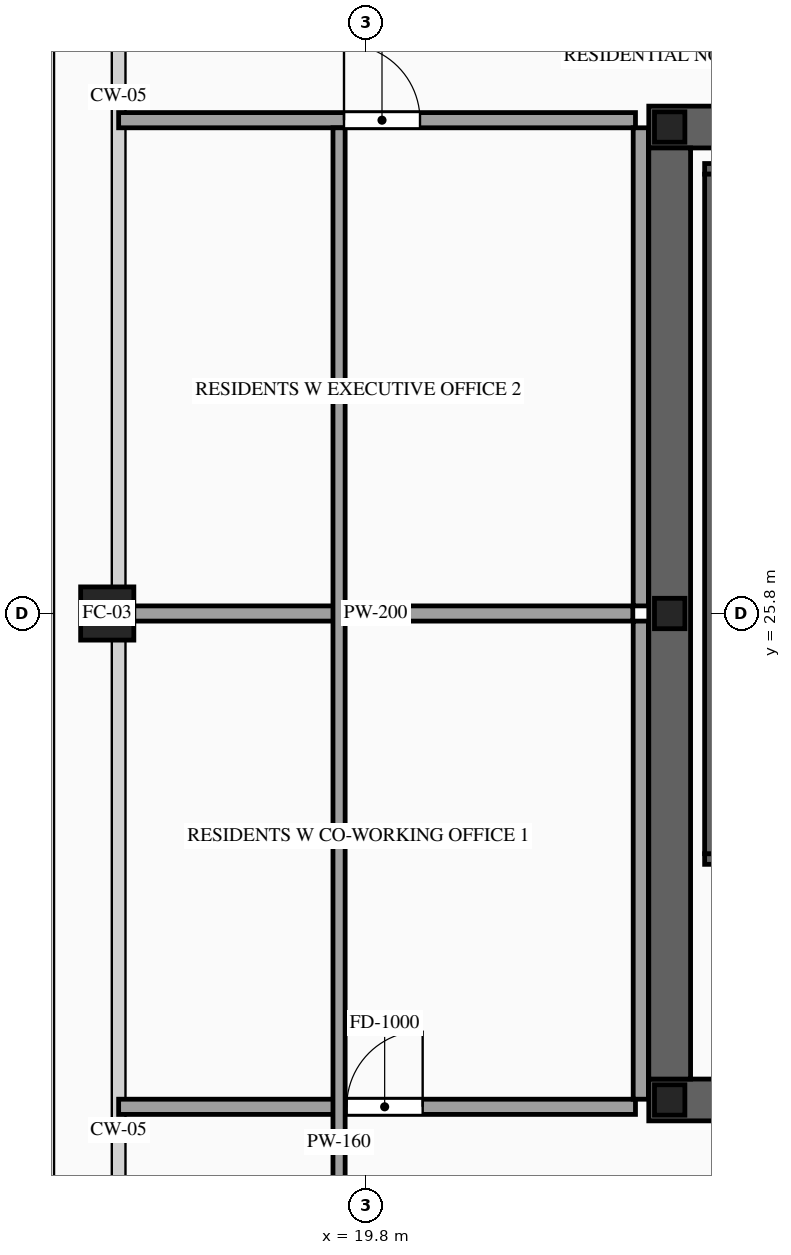
"""IFC4 building model, lengths in metres.
Left out: names, types, materials, properties, quantities, classifications, styles, units other than length and angle.
Written with IfcOpenShell. Run it as: python <this file> out.ifc"""

import sys

from ifc_helpers import new_model, si_unit, direction, frame, frame_2d, origin, origin_2d, place, context, subcontext, project, spatial, rectangle, hollow_rectangle, i_section, extrude, source, transform, mapped, element, fill, save


model = new_model("IFC4")
c1 = context("Model", 3, precision=1e-05, world=origin(), true_north=direction((0.0, 1.0)))
c2 = subcontext(c1, "Body", "Model", "MODEL_VIEW")
j1 = project(units=[si_unit("LENGTHUNIT", "METRE"), si_unit("PLANEANGLEUNIT", "RADIAN")], contexts=[c1])
p1 = place(None, origin())
s1 = spatial("IfcSite", under=j1, at=p1, CompositionType="ELEMENT")
p2 = place(p1, origin())
s2 = spatial("IfcBuilding", under=s1, at=p2, CompositionType="ELEMENT")
p3 = place(p2, frame((0.0, 0.0, 248.6)))
s3 = spatial("IfcBuildingStorey", under=s2, at=p3, CompositionType="ELEMENT", Elevation=248.6)
p4 = place(p3, frame((23.525, 19.4, 0.0), z_axis=(0.0, 0.0, 1.0), x_axis=(1.0, 0.0, 0.0)))
e1 = element("IfcWall", 1, at=p4, inside=s3, PredefinedType="SHEAR", context=c2, shape_type="SweptSolid", body=[
    extrude(rectangle(XDim=26.95, YDim=0.55, at=frame_2d((13.475, 0.0))), origin(), (0.0, 0.0, 1.0), 3.5),
])
p5 = place(p4, frame((1.925, 0.0, 0.0)))
e2 = element("IfcOpeningElement", 2, at=p5, cuts=e1, PredefinedType="OPENING", context=c2, shape_type="SweptSolid", body=[
    extrude(rectangle(XDim=1.1, YDim=2.2, at=frame_2d((0.55, 1.1))), frame((0.0, 0.29, 0.0), z_axis=(0.0, -1.0, 0.0), x_axis=(1.0, 0.0, 0.0)), (0.0, 0.0, 1.0), 0.58),
])
p6 = place(p4, frame((9.825, 0.0, 0.0)))
e3 = element("IfcOpeningElement", 3, at=p6, cuts=e1, PredefinedType="OPENING", context=c2, shape_type="SweptSolid", body=[
    extrude(rectangle(XDim=1.1, YDim=2.2, at=frame_2d((0.55, 1.1))), frame((0.0, 0.29, 0.0), z_axis=(0.0, -1.0, 0.0), x_axis=(1.0, 0.0, 0.0)), (0.0, 0.0, 1.0), 0.58),
])
p7 = place(p4, frame((23.025, 0.0, 0.0)))
e4 = element("IfcOpeningElement", 4, at=p7, cuts=e1, PredefinedType="OPENING", context=c2, shape_type="SweptSolid", body=[
    extrude(rectangle(XDim=1.1, YDim=2.2, at=frame_2d((0.55, 1.1))), frame((0.0, 0.29, 0.0), z_axis=(0.0, -1.0, 0.0), x_axis=(1.0, 0.0, 0.0)), (0.0, 0.0, 1.0), 0.58),
])
p8 = place(p4, frame((19.645, 0.0, 0.0)))
e5 = element("IfcOpeningElement", 5, at=p8, cuts=e1, PredefinedType="OPENING", context=c2, shape_type="SweptSolid", body=[
    extrude(rectangle(XDim=0.9, YDim=2.15, at=frame_2d((0.45, 1.075))), frame((0.0, 0.29, 0.0), z_axis=(0.0, -1.0, 0.0), x_axis=(1.0, 0.0, 0.0)), (0.0, 0.0, 1.0), 0.58),
])
p9 = place(p4, frame((18.205, 0.0, 0.0)))
e6 = element("IfcOpeningElement", 6, at=p9, cuts=e1, PredefinedType="OPENING", context=c2, shape_type="SweptSolid", body=[
    extrude(rectangle(XDim=0.9, YDim=2.15, at=frame_2d((0.45, 1.075))), frame((0.0, 0.29, 0.0), z_axis=(0.0, -1.0, 0.0), x_axis=(1.0, 0.0, 0.0)), (0.0, 0.0, 1.0), 0.58),
])
p10 = place(p3, frame((23.525, 32.2, 0.0), z_axis=(0.0, 0.0, 1.0), x_axis=(1.0, 0.0, 0.0)))
e7 = element("IfcWall", 7, at=p10, inside=s3, PredefinedType="SHEAR", context=c2, shape_type="SweptSolid", body=[
    extrude(rectangle(XDim=26.95, YDim=0.55, at=frame_2d((13.475, 0.0))), origin(), (0.0, 0.0, 1.0), 3.5),
])
p11 = place(p10, frame((4.545, 0.0, 0.0)))
e8 = element("IfcOpeningElement", 8, at=p11, cuts=e7, PredefinedType="OPENING", context=c2, shape_type="SweptSolid", body=[
    extrude(rectangle(XDim=0.9, YDim=2.15, at=frame_2d((0.45, 1.075))), frame((0.0, 0.29, 0.0), z_axis=(0.0, -1.0, 0.0), x_axis=(1.0, 0.0, 0.0)), (0.0, 0.0, 1.0), 0.58),
])
p12 = place(p10, frame((9.825, 0.0, 0.0)))
e9 = element("IfcOpeningElement", 9, at=p12, cuts=e7, PredefinedType="OPENING", context=c2, shape_type="SweptSolid", body=[
    extrude(rectangle(XDim=1.1, YDim=2.2, at=frame_2d((0.55, 1.1))), frame((0.0, 0.29, 0.0), z_axis=(0.0, -1.0, 0.0), x_axis=(1.0, 0.0, 0.0)), (0.0, 0.0, 1.0), 0.58),
])
p13 = place(p10, frame((15.675, 0.0, 0.0)))
e10 = element("IfcOpeningElement", 10, at=p13, cuts=e7, PredefinedType="OPENING", context=c2, shape_type="SweptSolid", body=[
    extrude(rectangle(XDim=1.1, YDim=2.2, at=frame_2d((0.55, 1.1))), frame((0.0, 0.29, 0.0), z_axis=(0.0, -1.0, 0.0), x_axis=(1.0, 0.0, 0.0)), (0.0, 0.0, 1.0), 0.58),
])
m1 = source(origin(), c2, "Body", "SweptSolid", [
    extrude(rectangle(XDim=12.25, YDim=0.55, at=frame_2d((6.125, 0.0))), origin(), (0.0, 0.0, 1.0), 3.5),
])
p14 = place(p3, frame((23.8, 19.675, 0.0), z_axis=(0.0, 0.0, 1.0), x_axis=(0.0, 1.0, 0.0)))
e11 = element("IfcWall", 11, at=p14, inside=s3, PredefinedType="SHEAR", context=c2, shape_type="MappedRepresentation", body=[
    mapped(m1, transform((0.0, 0.0, 0.0), scale=1.0)),
])
m2 = source(origin(), c2, "Body", "SweptSolid", [
    extrude(i_section(OverallWidth=0.4, OverallDepth=0.4, WebThickness=0.013, FlangeThickness=0.021, at=origin_2d()), origin(), (0.0, 0.0, 1.0), 3.5),
])
for number, where, z_axis, x_axis in (
    (12, (23.8, 19.4, 0.0), (0.0, 0.0, 1.0), (1.0, 0.0, 0.0)),
    (13, (23.8, 25.8, 0.0), (0.0, 0.0, 1.0), (1.0, 0.0, 0.0)),
    (14, (23.8, 32.2, 0.0), (0.0, 0.0, 1.0), (1.0, 0.0, 0.0)),
):
    element("IfcColumn", number, at=place(p3, frame(where, z_axis=z_axis, x_axis=x_axis)), inside=s3, PredefinedType="COLUMN", context=c2, shape_type="MappedRepresentation", body=[
        mapped(m2, transform((0.0, 0.0, 0.0), scale=1.0)),
    ])
m3 = source(origin(), c2, "Body", "SweptSolid", [
    extrude(hollow_rectangle(XDim=0.7, YDim=0.7, WallThickness=0.032, at=origin_2d()), origin(), (0.0, 0.0, 1.0), 3.5),
])
p15 = place(p3, frame((16.4, 25.8, 0.0), z_axis=(0.0, 0.0, 1.0), x_axis=(1.0, 0.0, 0.0)))
e15 = element("IfcColumn", 15, at=p15, inside=s3, PredefinedType="COLUMN", context=c2, shape_type="MappedRepresentation", body=[
    mapped(m3, transform((0.0, 0.0, 0.0), scale=1.0)),
])
p16 = place(p3, frame((24.26, 22.57, 0.0), z_axis=(0.0, 0.0, 1.0), x_axis=(1.0, 0.0, 0.0)))
e16 = element("IfcWall", 16, at=p16, inside=s3, PredefinedType="SOLIDWALL", context=c2, shape_type="SweptSolid", body=[
    extrude(rectangle(XDim=3.28, YDim=0.14, at=frame_2d((1.64, 0.0))), origin(), (0.0, 0.0, 1.0), 3.28),
])
p17 = place(p16, frame((1.09, 0.0, 0.0)))
e17 = element("IfcOpeningElement", 17, at=p17, cuts=e16, PredefinedType="OPENING", context=c2, shape_type="SweptSolid", body=[
    extrude(rectangle(XDim=1.1, YDim=2.2, at=frame_2d((0.55, 1.1))), frame((0.0, 0.085, 0.0), z_axis=(0.0, -1.0, 0.0), x_axis=(1.0, 0.0, 0.0)), (0.0, 0.0, 1.0), 0.17),
])
m4 = source(origin(), c2, "Body", "SweptSolid", [
    extrude(rectangle(XDim=3.28, YDim=0.14, at=frame_2d((1.64, 0.0))), origin(), (0.0, 0.0, 1.0), 3.28),
])
p18 = place(p3, frame((24.26, 31.65, 0.0), z_axis=(0.0, 0.0, 1.0), x_axis=(1.0, 0.0, 0.0)))
e18 = element("IfcWall", 18, at=p18, inside=s3, PredefinedType="SOLIDWALL", context=c2, shape_type="MappedRepresentation", body=[
    mapped(m4, transform((0.0, 0.0, 0.0), scale=1.0)),
])
m5 = source(origin(), c2, "Body", "SweptSolid", [
    extrude(rectangle(XDim=8.94, YDim=0.14, at=frame_2d((4.47, 0.0))), origin(), (0.0, 0.0, 1.0), 3.28),
])
p19 = place(p3, frame((24.33, 22.64, 0.0), z_axis=(0.0, 0.0, 1.0), x_axis=(0.0, 1.0, 0.0)))
e19 = element("IfcWall", 19, at=p19, inside=s3, PredefinedType="SOLIDWALL", context=c2, shape_type="MappedRepresentation", body=[
    mapped(m5, transform((0.0, 0.0, 0.0), scale=1.0)),
])
p20 = place(p3, frame((16.55, 19.31, 0.0), z_axis=(0.0, 0.0, 1.0), x_axis=(1.0, 0.0, 0.0)))
e20 = element("IfcWall", 20, at=p20, inside=s3, PredefinedType="PARTITIONING", context=c2, shape_type="SweptSolid", body=[
    extrude(rectangle(XDim=6.8, YDim=0.2, at=frame_2d((3.4, 0.0))), origin(), (0.0, 0.0, 1.0), 2.825),
])
p21 = place(p20, frame((3.0, 0.0, 0.0)))
e21 = element("IfcOpeningElement", 21, at=p21, cuts=e20, PredefinedType="OPENING", context=c2, shape_type="SweptSolid", body=[
    extrude(rectangle(XDim=1.0, YDim=2.2, at=frame_2d((0.5, 1.1))), frame((0.0, 0.115, 0.0), z_axis=(0.0, -1.0, 0.0), x_axis=(1.0, 0.0, 0.0)), (0.0, 0.0, 1.0), 0.23),
])
m6 = source(origin(), c2, "Body", "SweptSolid", [
    extrude(rectangle(XDim=6.765, YDim=0.2, at=frame_2d((3.382, 0.0))), origin(), (0.0, 0.0, 1.0), 2.787),
])
p22 = place(p3, frame((16.55, 25.8, 0.0), z_axis=(0.0, 0.0, 1.0), x_axis=(1.0, 0.0, 0.0)))
e22 = element("IfcWall", 22, at=p22, inside=s3, PredefinedType="PARTITIONING", context=c2, shape_type="MappedRepresentation", body=[
    mapped(m6, transform((0.0, 0.0, 0.0), scale=1.0)),
])
m7 = source(origin(), c2, "Body", "SweptSolid", [
    extrude(rectangle(XDim=6.29, YDim=0.2, at=frame_2d((3.145, 0.0))), origin(), (0.0, 0.0, 1.0), 3.28),
])
p23 = place(p3, frame((23.42, 19.41, 0.0), z_axis=(0.0, 0.0, 1.0), x_axis=(0.0, 1.0, 0.0)))
e23 = element("IfcWall", 23, at=p23, inside=s3, PredefinedType="PARTITIONING", context=c2, shape_type="MappedRepresentation", body=[
    mapped(m7, transform((0.0, 0.0, 0.0), scale=1.0)),
])
p24 = place(p3, frame((16.55, 32.29, 0.0), z_axis=(0.0, 0.0, 1.0), x_axis=(1.0, 0.0, 0.0)))
e24 = element("IfcWall", 24, at=p24, inside=s3, PredefinedType="PARTITIONING", context=c2, shape_type="SweptSolid", body=[
    extrude(rectangle(XDim=6.8, YDim=0.2, at=frame_2d((3.4, 0.0))), origin(), (0.0, 0.0, 1.0), 2.825),
])
p25 = place(p24, frame((2.965, 0.0, 0.0)))
e25 = element("IfcOpeningElement", 25, at=p25, cuts=e24, PredefinedType="OPENING", context=c2, shape_type="SweptSolid", body=[
    extrude(rectangle(XDim=1.0, YDim=2.2, at=frame_2d((0.5, 1.1))), frame((0.0, 0.115, 0.0), z_axis=(0.0, -1.0, 0.0), x_axis=(1.0, 0.0, 0.0)), (0.0, 0.0, 1.0), 0.23),
])
m8 = source(origin(), c2, "Body", "SweptSolid", [
    extrude(rectangle(XDim=26.69, YDim=0.16, at=frame_2d((13.345, 0.0))), origin(), (0.0, 0.0, 1.0), 3.28),
])
p26 = place(p3, frame((19.45, 5.5, 0.0), z_axis=(0.0, 0.0, 1.0), x_axis=(0.0, 1.0, 0.0)))
e26 = element("IfcWall", 26, at=p26, inside=s3, PredefinedType="PARTITIONING", context=c2, shape_type="MappedRepresentation", body=[
    mapped(m8, transform((0.0, 0.0, 0.0), scale=1.0)),
])
p27 = place(p3, frame((23.42, 25.9, 0.0), z_axis=(0.0, 0.0, 1.0), x_axis=(0.0, 1.0, 0.0)))
e27 = element("IfcWall", 27, at=p27, inside=s3, PredefinedType="PARTITIONING", context=c2, shape_type="MappedRepresentation", body=[
    mapped(m7, transform((0.0, 0.0, 0.0), scale=1.0)),
])
m9 = source(origin(), c2, "Body", "SweptSolid", [
    extrude(rectangle(XDim=1.0, YDim=2.2, at=frame_2d((0.5, 1.1))), frame((0.0, 0.025, 0.0), z_axis=(0.0, -1.0, 0.0), x_axis=(1.0, 0.0, 0.0)), (0.0, 0.0, 1.0), 0.05),
])
p28 = place(p21, origin())
e28 = element("IfcDoor", 28, at=p28, inside=s3, OperationType="SINGLE_SWING_RIGHT", PredefinedType="DOOR", context=c2, shape_type="MappedRepresentation", body=[
    mapped(m9, transform((0.0, 0.0, 0.0), scale=1.0)),
])
fill(e21, e28)
p29 = place(p25, origin())
e29 = element("IfcDoor", 29, at=p29, inside=s3, OperationType="SINGLE_SWING_LEFT", PredefinedType="DOOR", context=c2, shape_type="MappedRepresentation", body=[
    mapped(m9, transform((0.0, 0.0, 0.0), scale=1.0)),
])
fill(e25, e29)
save(model, sys.argv[1])
